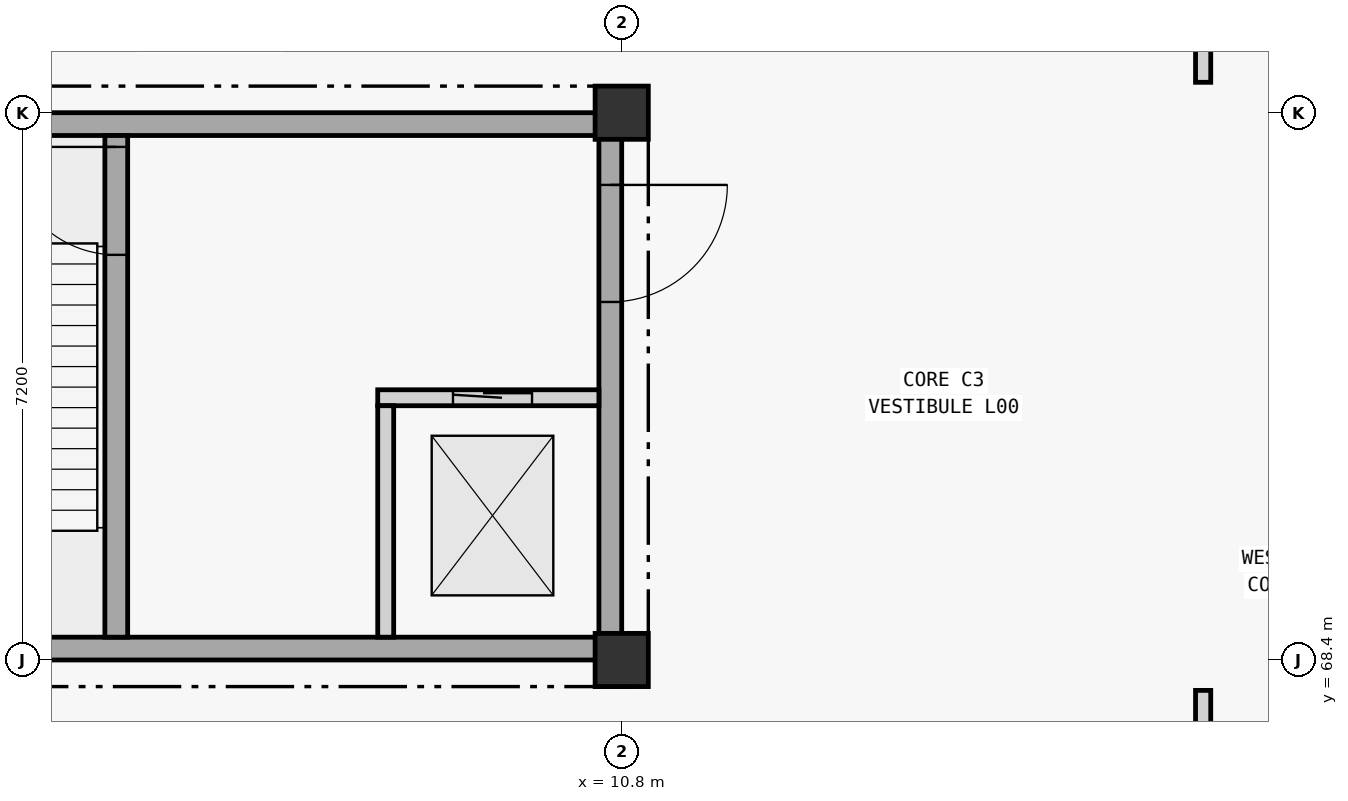
"""IFC4 building model, lengths in metres.
Left out: names, types, materials, properties, quantities, classifications, styles, units other than length and angle.
Written with IfcOpenShell. Run it as: python <this file> out.ifc"""

import sys

from ifc_helpers import new_model, si_unit, direction, frame, frame_2d, origin, origin_2d, place, context, subcontext, project, spatial, rectangle, extrude, element, fill, save


model = new_model("IFC4")
c1 = context("Model", 3, precision=1e-05, world=origin(), true_north=direction((0.0, 1.0)))
c2 = subcontext(c1, "Body", "Model", "MODEL_VIEW")
j1 = project(units=[si_unit("LENGTHUNIT", "METRE"), si_unit("PLANEANGLEUNIT", "RADIAN")], contexts=[c1])
p1 = place(None, origin())
s1 = spatial("IfcSite", under=j1, at=p1, CompositionType="ELEMENT")
p2 = place(p1, origin())
s2 = spatial("IfcBuilding", under=s1, at=p2, CompositionType="ELEMENT")
p3 = place(p2, origin())
s3 = spatial("IfcBuildingStorey", under=s2, at=p3, CompositionType="ELEMENT", Elevation=0.0)
for number, where, z_axis, x_axis in (
    (1, (10.8, 68.4, -0.3), (0.0, 0.0, 1.0), (1.0, 0.0, 0.0)),
    (2, (10.8, 75.6, -0.3), (0.0, 0.0, 1.0), (1.0, 0.0, 0.0)),
):
    element("IfcColumn", number, at=place(p3, frame(where, z_axis=z_axis, x_axis=x_axis)), inside=s3, PredefinedType="COLUMN", context=c2, shape_type="SweptSolid", body=[
        extrude(rectangle(XDim=0.7, YDim=0.7, at=origin_2d()), origin(), (0.0, 0.0, 1.0), 5.7),
    ])
for number, where, z_axis, x_axis in (
    (3, (10.8, 68.55, 0.0), (0.0, 0.0, 1.0), (-1.0, 0.0, 0.0)),
    (4, (0.0, 75.45, 0.0), (0.0, 0.0, 1.0), (1.0, 0.0, 0.0)),
):
    element("IfcWall", number, at=place(p3, frame(where, z_axis=z_axis, x_axis=x_axis)), inside=s3, PredefinedType="SHEAR", context=c2, shape_type="SweptSolid", body=[
        extrude(rectangle(XDim=10.8, YDim=0.3, at=frame_2d((5.4, 0.0))), origin(), (0.0, 0.0, 1.0), 5.4),
    ])
p4 = place(p3, frame((10.65, 75.3, 0.0), z_axis=(0.0, 0.0, 1.0), x_axis=(0.0, -1.0, 0.0)))
e5 = element("IfcWall", 5, at=p4, inside=s3, PredefinedType="SHEAR", context=c2, shape_type="SweptSolid", body=[
    extrude(rectangle(XDim=6.6, YDim=0.3, at=frame_2d((3.3, 0.0))), origin(), (0.0, 0.0, 1.0), 5.4),
])
p5 = place(p4, frame((0.65, 0.0, 0.0)))
e6 = element("IfcOpeningElement", 6, at=p5, cuts=e5, PredefinedType="OPENING", context=c2, shape_type="SweptSolid", body=[
    extrude(rectangle(XDim=1.54, YDim=2.22, at=frame_2d((0.77, 1.11))), frame((0.0, 0.15, 0.0), z_axis=(0.0, -1.0, 0.0), x_axis=(1.0, 0.0, 0.0)), (0.0, 0.0, 1.0), 0.3),
])
p6 = place(p3, frame((4.15, 68.7, 0.0), z_axis=(0.0, 0.0, 1.0), x_axis=(0.0, 1.0, 0.0)))
e7 = element("IfcWall", 7, at=p6, inside=s3, PredefinedType="SHEAR", context=c2, shape_type="SweptSolid", body=[
    extrude(rectangle(XDim=6.6, YDim=0.3, at=frame_2d((3.3, 0.0))), origin(), (0.0, 0.0, 1.0), 5.4),
])
p7 = place(p6, frame((5.03, 0.0, 0.0)))
e8 = element("IfcOpeningElement", 8, at=p7, cuts=e7, PredefinedType="OPENING", context=c2, shape_type="SweptSolid", body=[
    extrude(rectangle(XDim=1.42, YDim=2.2, at=frame_2d((0.71, 1.1))), frame((0.0, 0.15, 0.0), z_axis=(0.0, -1.0, 0.0), x_axis=(1.0, 0.0, 0.0)), (0.0, 0.0, 1.0), 0.3),
])
p8 = place(p3, frame((7.59, 71.85, 0.0), z_axis=(0.0, 0.0, 1.0), x_axis=(1.0, 0.0, 0.0)))
e9 = element("IfcWall", 9, at=p8, inside=s3, PredefinedType="STANDARD", context=c2, shape_type="SweptSolid", body=[
    extrude(rectangle(XDim=2.91, YDim=0.21, at=frame_2d((1.455, 0.0))), origin(), (0.0, 0.0, 1.0), 5.4),
])
p9 = place(p8, frame((0.99, 0.0, 0.0)))
e10 = element("IfcOpeningElement", 10, at=p9, cuts=e9, PredefinedType="OPENING", context=c2, shape_type="SweptSolid", body=[
    extrude(rectangle(XDim=1.04, YDim=2.16, at=frame_2d((0.52, 1.08))), frame((0.0, 0.105, 0.0), z_axis=(0.0, -1.0, 0.0), x_axis=(1.0, 0.0, 0.0)), (0.0, 0.0, 1.0), 0.21),
])
p10 = place(p3, frame((7.695, 68.7, 0.0), z_axis=(0.0, 0.0, 1.0), x_axis=(0.0, 1.0, 0.0)))
e11 = element("IfcWall", 11, at=p10, inside=s3, PredefinedType="STANDARD", context=c2, shape_type="SweptSolid", body=[
    extrude(rectangle(XDim=3.045, YDim=0.21, at=frame_2d((1.522, 0.0))), origin(), (0.0, 0.0, 1.0), 5.4),
])
p11 = place(p3, frame((18.45, 47.3, 0.0), z_axis=(0.0, 0.0, 1.0), x_axis=(0.0, 1.0, 0.0)))
e12 = element("IfcWall", 12, at=p11, inside=s3, PredefinedType="STANDARD", context=c2, shape_type="SweptSolid", body=[
    extrude(rectangle(XDim=20.7, YDim=0.2, at=frame_2d((10.35, 0.0))), origin(), (0.0, 0.0, 1.0), 4.2),
])
p12 = place(p11, frame((9.57, 0.0, 0.0)))
e13 = element("IfcOpeningElement", 13, at=p12, cuts=e12, PredefinedType="OPENING", context=c2, shape_type="SweptSolid", body=[
    extrude(rectangle(XDim=1.56, YDim=2.25, at=frame_2d((0.78, 1.125))), frame((0.0, 0.1, 0.0), z_axis=(0.0, -1.0, 0.0), x_axis=(1.0, 0.0, 0.0)), (0.0, 0.0, 1.0), 0.2),
])
p13 = place(p3, frame((18.45, 76.0, 0.0), z_axis=(0.0, 0.0, 1.0), x_axis=(0.0, 1.0, 0.0)))
e14 = element("IfcWall", 14, at=p13, inside=s3, PredefinedType="STANDARD", context=c2, shape_type="SweptSolid", body=[
    extrude(rectangle(XDim=20.8, YDim=0.2, at=frame_2d((10.4, 0.0))), origin(), (0.0, 0.0, 1.0), 4.2),
])
p14 = place(p13, frame((9.57, 0.0, 0.0)))
e15 = element("IfcOpeningElement", 15, at=p14, cuts=e14, PredefinedType="OPENING", context=c2, shape_type="SweptSolid", body=[
    extrude(rectangle(XDim=1.66, YDim=2.32, at=frame_2d((0.83, 1.16))), frame((0.0, 0.1, 0.0), z_axis=(0.0, -1.0, 0.0), x_axis=(1.0, 0.0, 0.0)), (0.0, 0.0, 1.0), 0.2),
])
p15 = place(p9, origin())
e16 = element("IfcDoor", 16, at=p15, inside=s3, OperationType="SLIDING_TO_LEFT", PredefinedType="DOOR", context=c2, shape_type="SweptSolid", body=[
    extrude(rectangle(XDim=1.04, YDim=2.16, at=frame_2d((0.52, 1.08))), frame((0.0, 0.025, 0.0), z_axis=(0.0, -1.0, 0.0), x_axis=(1.0, 0.0, 0.0)), (0.0, 0.0, 1.0), 0.05),
])
fill(e10, e16)
p16 = place(p7, origin())
e17 = element("IfcDoor", 17, at=p16, inside=s3, OperationType="SINGLE_SWING_RIGHT", PredefinedType="DOOR", context=c2, shape_type="SweptSolid", body=[
    extrude(rectangle(XDim=1.42, YDim=2.2, at=frame_2d((0.71, 1.1))), frame((0.0, 0.025, 0.0), z_axis=(0.0, -1.0, 0.0), x_axis=(1.0, 0.0, 0.0)), (0.0, 0.0, 1.0), 0.05),
])
fill(e8, e17)
p17 = place(p5, origin())
e18 = element("IfcDoor", 18, at=p17, inside=s3, OperationType="SINGLE_SWING_LEFT", PredefinedType="DOOR", context=c2, shape_type="SweptSolid", body=[
    extrude(rectangle(XDim=1.54, YDim=2.22, at=frame_2d((0.77, 1.11))), frame((0.0, 0.025, 0.0), z_axis=(0.0, -1.0, 0.0), x_axis=(1.0, 0.0, 0.0)), (0.0, 0.0, 1.0), 0.05),
])
fill(e6, e18)
save(model, sys.argv[1])
